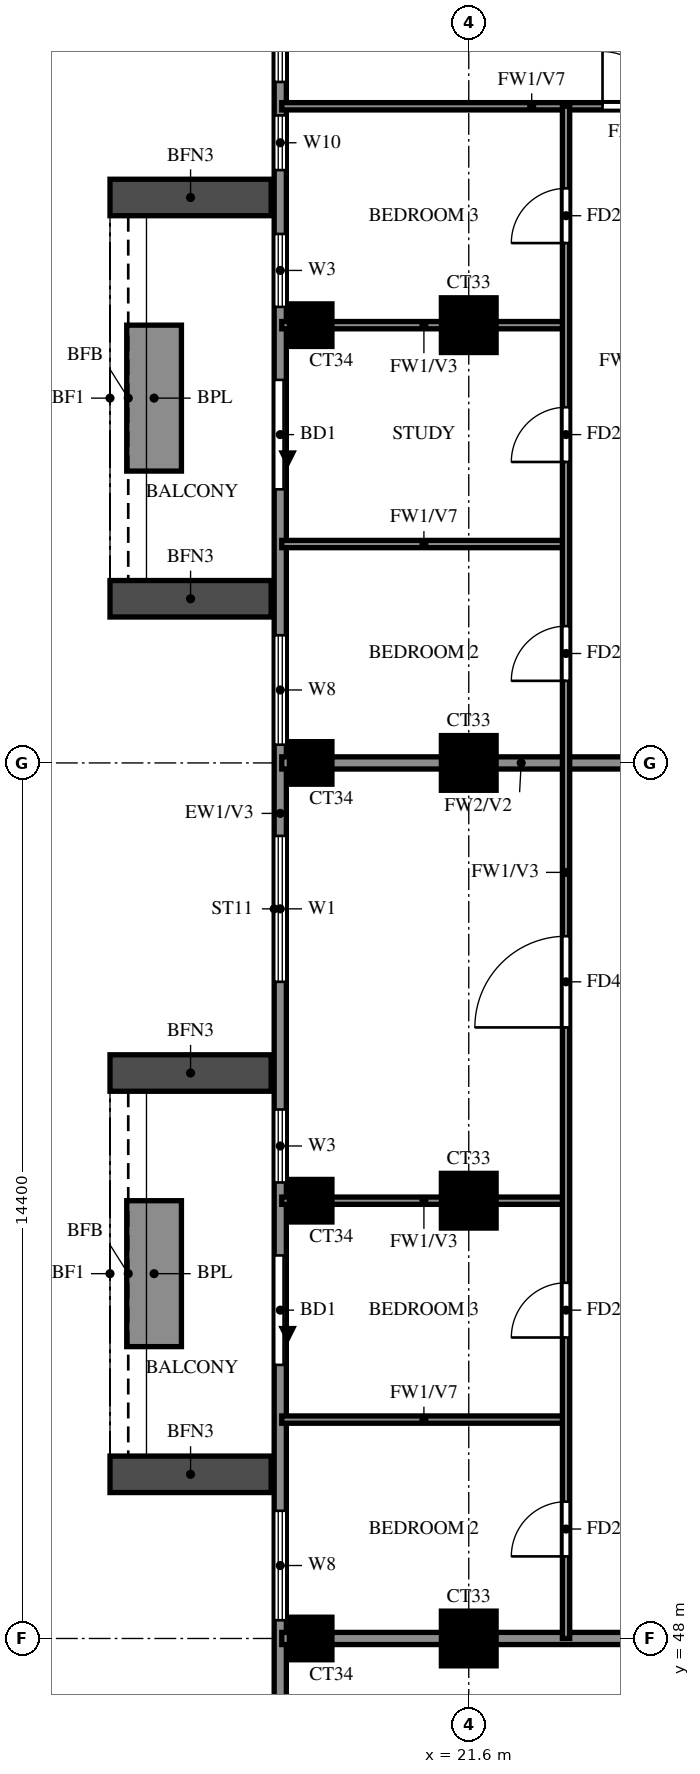
"""IFC4 building model, lengths in metres.
Left out: names, types, materials, properties, quantities, classifications, styles, units other than length and angle.
Written with IfcOpenShell. Run it as: python <this file> out.ifc"""

import sys

from ifc_helpers import new_model, si_unit, direction, frame, frame_2d, origin, origin_2d, place, context, subcontext, project, spatial, rectangle, extrude, source, transform, mapped, element, fill, save


model = new_model("IFC4")
c1 = context("Model", 3, precision=1e-05, world=origin(), true_north=direction((0.0, 1.0)))
c2 = subcontext(c1, "Body", "Model", "MODEL_VIEW")
j1 = project(units=[si_unit("LENGTHUNIT", "METRE"), si_unit("PLANEANGLEUNIT", "RADIAN")], contexts=[c1])
p1 = place(None, origin())
s1 = spatial("IfcSite", under=j1, at=p1, CompositionType="ELEMENT")
p2 = place(p1, origin())
s2 = spatial("IfcBuilding", under=s1, at=p2, CompositionType="ELEMENT")
p3 = place(p2, frame((0.0, 0.0, 222.0)))
s3 = spatial("IfcBuildingStorey", under=s2, at=p3, CompositionType="ELEMENT", Elevation=222.0)
m1 = source(origin(), c2, "Body", "SweptSolid", [
    extrude(rectangle(XDim=0.7, YDim=0.7, at=origin_2d()), origin(), (0.0, 0.0, 1.0), 3.22),
])
p4 = place(p3, frame((19.0, 48.0, 0.0), z_axis=(0.0, 0.0, 1.0), x_axis=(1.0, 0.0, 0.0)))
e1 = element("IfcColumn", 1, at=p4, inside=s3, PredefinedType="COLUMN", context=c2, shape_type="MappedRepresentation", body=[
    mapped(m1, transform((0.0, 0.0, 0.0))),
])
m2 = source(origin(), c2, "Body", "SweptSolid", [
    extrude(rectangle(XDim=0.9, YDim=0.9, at=origin_2d()), origin(), (0.0, 0.0, 1.0), 3.22),
])
p5 = place(p3, frame((21.6, 48.0, 0.0), z_axis=(0.0, 0.0, 1.0), x_axis=(1.0, 0.0, 0.0)))
e2 = element("IfcColumn", 2, at=p5, inside=s3, PredefinedType="COLUMN", context=c2, shape_type="MappedRepresentation", body=[
    mapped(m2, transform((0.0, 0.0, 0.0))),
])
p6 = place(p3, frame((19.0, 55.2, 0.0), z_axis=(0.0, 0.0, 1.0), x_axis=(1.0, 0.0, 0.0)))
e3 = element("IfcColumn", 3, at=p6, inside=s3, PredefinedType="COLUMN", context=c2, shape_type="MappedRepresentation", body=[
    mapped(m1, transform((0.0, 0.0, 0.0))),
])
p7 = place(p3, frame((21.6, 55.2, 0.0), z_axis=(0.0, 0.0, 1.0), x_axis=(1.0, 0.0, 0.0)))
e4 = element("IfcColumn", 4, at=p7, inside=s3, PredefinedType="COLUMN", context=c2, shape_type="MappedRepresentation", body=[
    mapped(m2, transform((0.0, 0.0, 0.0))),
])
p8 = place(p3, frame((19.0, 62.4, 0.0), z_axis=(0.0, 0.0, 1.0), x_axis=(1.0, 0.0, 0.0)))
e5 = element("IfcColumn", 5, at=p8, inside=s3, PredefinedType="COLUMN", context=c2, shape_type="MappedRepresentation", body=[
    mapped(m1, transform((0.0, 0.0, 0.0))),
])
p9 = place(p3, frame((21.6, 62.4, 0.0), z_axis=(0.0, 0.0, 1.0), x_axis=(1.0, 0.0, 0.0)))
e6 = element("IfcColumn", 6, at=p9, inside=s3, PredefinedType="COLUMN", context=c2, shape_type="MappedRepresentation", body=[
    mapped(m2, transform((0.0, 0.0, 0.0))),
])
p10 = place(p3, frame((19.0, 69.6, 0.0), z_axis=(0.0, 0.0, 1.0), x_axis=(1.0, 0.0, 0.0)))
e7 = element("IfcColumn", 7, at=p10, inside=s3, PredefinedType="COLUMN", context=c2, shape_type="MappedRepresentation", body=[
    mapped(m1, transform((0.0, 0.0, 0.0))),
])
p11 = place(p3, frame((21.6, 69.6, 0.0), z_axis=(0.0, 0.0, 1.0), x_axis=(1.0, 0.0, 0.0)))
e8 = element("IfcColumn", 8, at=p11, inside=s3, PredefinedType="COLUMN", context=c2, shape_type="MappedRepresentation", body=[
    mapped(m2, transform((0.0, 0.0, 0.0))),
])
p12 = place(p3, frame((18.5, 76.6, 0.0), z_axis=(0.0, 0.0, 1.0), x_axis=(0.0, -1.0, 0.0)))
e9 = element("IfcWall", 9, at=p12, inside=s3, PredefinedType="SOLIDWALL", context=c2, shape_type="SweptSolid", body=[
    extrude(rectangle(XDim=33.4, YDim=0.2, at=frame_2d((16.7, 0.0))), origin(), (0.0, 0.0, 1.0), 3.22),
])
p13 = place(p12, frame((7.9, 0.0, 0.0)))
e10 = element("IfcOpeningElement", 10, at=p13, cuts=e9, PredefinedType="OPENING", context=c2, shape_type="SweptSolid", body=[
    extrude(rectangle(XDim=1.8, YDim=2.4, at=frame_2d((0.9, 1.2))), frame((0.0, 0.11, 0.0), z_axis=(0.0, -1.0, 0.0), x_axis=(1.0, 0.0, 0.0)), (0.0, 0.0, 1.0), 0.22),
])
p14 = place(p12, frame((22.3, 0.0, 0.0)))
e11 = element("IfcOpeningElement", 11, at=p14, cuts=e9, PredefinedType="OPENING", context=c2, shape_type="SweptSolid", body=[
    extrude(rectangle(XDim=1.8, YDim=2.4, at=frame_2d((0.9, 1.2))), frame((0.0, 0.11, 0.0), z_axis=(0.0, -1.0, 0.0), x_axis=(1.0, 0.0, 0.0)), (0.0, 0.0, 1.0), 0.22),
])
p15 = place(p12, frame((29.7, 0.0, 0.6)))
e12 = element("IfcOpeningElement", 12, at=p15, cuts=e9, PredefinedType="OPENING", context=c2, shape_type="SweptSolid", body=[
    extrude(rectangle(XDim=2.4, YDim=2.4, at=frame_2d((1.2, 1.2))), frame((0.0, 0.11, 0.0), z_axis=(0.0, -1.0, 0.0), x_axis=(1.0, 0.0, 0.0)), (0.0, 0.0, 1.0), 0.22),
])
p16 = place(p12, frame((26.5, 0.0, 0.6)))
e13 = element("IfcOpeningElement", 13, at=p16, cuts=e9, PredefinedType="OPENING", context=c2, shape_type="SweptSolid", body=[
    extrude(rectangle(XDim=1.8, YDim=2.4, at=frame_2d((0.9, 1.2))), frame((0.0, 0.11, 0.0), z_axis=(0.0, -1.0, 0.0), x_axis=(1.0, 0.0, 0.0)), (0.0, 0.0, 1.0), 0.22),
])
p17 = place(p12, frame((15.4, 0.0, 0.6)))
e14 = element("IfcOpeningElement", 14, at=p17, cuts=e9, PredefinedType="OPENING", context=c2, shape_type="SweptSolid", body=[
    extrude(rectangle(XDim=2.4, YDim=2.4, at=frame_2d((1.2, 1.2))), frame((0.0, 0.11, 0.0), z_axis=(0.0, -1.0, 0.0), x_axis=(1.0, 0.0, 0.0)), (0.0, 0.0, 1.0), 0.22),
])
p18 = place(p12, frame((19.9, 0.0, 0.6)))
e15 = element("IfcOpeningElement", 15, at=p18, cuts=e9, PredefinedType="OPENING", context=c2, shape_type="SweptSolid", body=[
    extrude(rectangle(XDim=1.2, YDim=2.4, at=frame_2d((0.6, 1.2))), frame((0.0, 0.11, 0.0), z_axis=(0.0, -1.0, 0.0), x_axis=(1.0, 0.0, 0.0)), (0.0, 0.0, 1.0), 0.22),
])
p19 = place(p12, frame((12.1, 0.0, 0.6)))
e16 = element("IfcOpeningElement", 16, at=p19, cuts=e9, PredefinedType="OPENING", context=c2, shape_type="SweptSolid", body=[
    extrude(rectangle(XDim=1.8, YDim=2.4, at=frame_2d((0.9, 1.2))), frame((0.0, 0.11, 0.0), z_axis=(0.0, -1.0, 0.0), x_axis=(1.0, 0.0, 0.0)), (0.0, 0.0, 1.0), 0.22),
])
p20 = place(p12, frame((3.55, 0.0, 0.6)))
e17 = element("IfcOpeningElement", 17, at=p20, cuts=e9, PredefinedType="OPENING", context=c2, shape_type="SweptSolid", body=[
    extrude(rectangle(XDim=0.9, YDim=2.4, at=frame_2d((0.45, 1.2))), frame((0.0, 0.11, 0.0), z_axis=(0.0, -1.0, 0.0), x_axis=(1.0, 0.0, 0.0)), (0.0, 0.0, 1.0), 0.22),
])
p21 = place(p12, frame((5.5, 0.0, 0.6)))
e18 = element("IfcOpeningElement", 18, at=p21, cuts=e9, PredefinedType="OPENING", context=c2, shape_type="SweptSolid", body=[
    extrude(rectangle(XDim=1.2, YDim=2.4, at=frame_2d((0.6, 1.2))), frame((0.0, 0.11, 0.0), z_axis=(0.0, -1.0, 0.0), x_axis=(1.0, 0.0, 0.0)), (0.0, 0.0, 1.0), 0.22),
])
p22 = place(p12, frame((0.6, 0.0, 0.6)))
e19 = element("IfcOpeningElement", 19, at=p22, cuts=e9, PredefinedType="OPENING", context=c2, shape_type="SweptSolid", body=[
    extrude(rectangle(XDim=2.4, YDim=2.4, at=frame_2d((1.2, 1.2))), frame((0.0, 0.11, 0.0), z_axis=(0.0, -1.0, 0.0), x_axis=(1.0, 0.0, 0.0)), (0.0, 0.0, 1.0), 0.22),
])
for number, where, z_axis, x_axis in (
    (20, (18.35, 71.7, 0.0), (0.0, 0.0, 1.0), (-1.0, 0.0, 0.0)),
    (21, (18.35, 65.1, 0.0), (0.0, 0.0, 1.0), (-1.0, 0.0, 0.0)),
):
    element("IfcWall", number, at=place(p3, frame(where, z_axis=z_axis, x_axis=x_axis)), inside=s3, PredefinedType="SOLIDWALL", context=c2, shape_type="SweptSolid", body=[
        extrude(rectangle(XDim=2.65, YDim=0.6, at=frame_2d((1.325, 0.0))), origin(), (0.0, 0.0, 1.0), 2.85),
    ])
p23 = place(p3, frame((16.425, 69.6, 0.0), z_axis=(0.0, 0.0, 1.0), x_axis=(0.0, -1.0, 0.0)))
e22 = element("IfcWall", 22, at=p23, inside=s3, PredefinedType="SOLIDWALL", context=c2, shape_type="SweptSolid", body=[
    extrude(rectangle(XDim=2.4, YDim=0.9, at=frame_2d((1.2, 0.0))), origin(), (0.0, 0.0, 1.0), 0.9),
])
for number, where, z_axis, x_axis in (
    (23, (18.35, 57.3, 0.0), (0.0, 0.0, 1.0), (-1.0, 0.0, 0.0)),
    (24, (18.35, 50.7, 0.0), (0.0, 0.0, 1.0), (-1.0, 0.0, 0.0)),
):
    element("IfcWall", number, at=place(p3, frame(where, z_axis=z_axis, x_axis=x_axis)), inside=s3, PredefinedType="SOLIDWALL", context=c2, shape_type="SweptSolid", body=[
        extrude(rectangle(XDim=2.65, YDim=0.6, at=frame_2d((1.325, 0.0))), origin(), (0.0, 0.0, 1.0), 2.85),
    ])
p24 = place(p3, frame((16.425, 55.2, 0.0), z_axis=(0.0, 0.0, 1.0), x_axis=(0.0, -1.0, 0.0)))
e25 = element("IfcWall", 25, at=p24, inside=s3, PredefinedType="SOLIDWALL", context=c2, shape_type="SweptSolid", body=[
    extrude(rectangle(XDim=2.4, YDim=0.9, at=frame_2d((1.2, 0.0))), origin(), (0.0, 0.0, 1.0), 0.9),
])
p25 = place(p3, frame((18.525, 48.0, 0.0), z_axis=(0.0, 0.0, 1.0), x_axis=(1.0, 0.0, 0.0)))
e26 = element("IfcWall", 26, at=p25, inside=s3, PredefinedType="SOLIDWALL", context=c2, shape_type="SweptSolid", body=[
    extrude(rectangle(XDim=15.075, YDim=0.2, at=frame_2d((7.538, 0.0))), origin(), (0.0, 0.0, 1.0), 3.22),
])
p26 = place(p3, frame((18.525, 62.4, 0.0), z_axis=(0.0, 0.0, 1.0), x_axis=(1.0, 0.0, 0.0)))
e27 = element("IfcWall", 27, at=p26, inside=s3, PredefinedType="SOLIDWALL", context=c2, shape_type="SweptSolid", body=[
    extrude(rectangle(XDim=7.875, YDim=0.2, at=frame_2d((3.938, 0.0))), origin(), (0.0, 0.0, 1.0), 3.22),
])
p27 = place(p3, frame((18.525, 51.6, 0.0), z_axis=(0.0, 0.0, 1.0), x_axis=(1.0, 0.0, 0.0)))
e28 = element("IfcWall", 28, at=p27, inside=s3, PredefinedType="PARTITIONING", context=c2, shape_type="SweptSolid", body=[
    extrude(rectangle(XDim=4.675, YDim=0.12, at=frame_2d((2.337, 0.0))), origin(), (0.0, 0.0, 1.0), 2.32),
])
p28 = place(p3, frame((18.525, 55.2, 0.0), z_axis=(0.0, 0.0, 1.0), x_axis=(1.0, 0.0, 0.0)))
e29 = element("IfcWall", 29, at=p28, inside=s3, PredefinedType="PARTITIONING", context=c2, shape_type="SweptSolid", body=[
    extrude(rectangle(XDim=4.675, YDim=0.12, at=frame_2d((2.337, 0.0))), origin(), (0.0, 0.0, 1.0), 3.22),
])
p29 = place(p3, frame((18.525, 66.0, 0.0), z_axis=(0.0, 0.0, 1.0), x_axis=(1.0, 0.0, 0.0)))
e30 = element("IfcWall", 30, at=p29, inside=s3, PredefinedType="PARTITIONING", context=c2, shape_type="SweptSolid", body=[
    extrude(rectangle(XDim=4.675, YDim=0.12, at=frame_2d((2.337, 0.0))), origin(), (0.0, 0.0, 1.0), 2.32),
])
p30 = place(p3, frame((18.525, 69.6, 0.0), z_axis=(0.0, 0.0, 1.0), x_axis=(1.0, 0.0, 0.0)))
e31 = element("IfcWall", 31, at=p30, inside=s3, PredefinedType="PARTITIONING", context=c2, shape_type="SweptSolid", body=[
    extrude(rectangle(XDim=4.675, YDim=0.12, at=frame_2d((2.337, 0.0))), origin(), (0.0, 0.0, 1.0), 3.22),
])
p31 = place(p3, frame((18.525, 73.2, 0.0), z_axis=(0.0, 0.0, 1.0), x_axis=(1.0, 0.0, 0.0)))
e32 = element("IfcWall", 32, at=p31, inside=s3, PredefinedType="PARTITIONING", context=c2, shape_type="SweptSolid", body=[
    extrude(rectangle(XDim=10.275, YDim=0.12, at=frame_2d((5.138, 0.0))), origin(), (0.0, 0.0, 1.0), 2.32),
])
p32 = place(p31, frame((5.275, 0.0, 0.0)))
e33 = element("IfcOpeningElement", 33, at=p32, cuts=e32, PredefinedType="OPENING", context=c2, shape_type="SweptSolid", body=[
    extrude(rectangle(XDim=0.9, YDim=2.1, at=frame_2d((0.45, 1.05))), frame((0.0, 0.07, 0.0), z_axis=(0.0, -1.0, 0.0), x_axis=(1.0, 0.0, 0.0)), (0.0, 0.0, 1.0), 0.14),
])
p33 = place(p3, frame((23.2, 48.0, 0.0), z_axis=(0.0, 0.0, 1.0), x_axis=(0.0, 1.0, 0.0)))
e34 = element("IfcWall", 34, at=p33, inside=s3, PredefinedType="PARTITIONING", context=c2, shape_type="SweptSolid", body=[
    extrude(rectangle(XDim=25.2, YDim=0.12, at=frame_2d((12.6, 0.0))), origin(), (0.0, 0.0, 1.0), 3.22),
])
p34 = place(p33, frame((1.35, 0.0, 0.0)))
e35 = element("IfcOpeningElement", 35, at=p34, cuts=e34, PredefinedType="OPENING", context=c2, shape_type="SweptSolid", body=[
    extrude(rectangle(XDim=0.9, YDim=2.1, at=frame_2d((0.45, 1.05))), frame((0.0, 0.07, 0.0), z_axis=(0.0, -1.0, 0.0), x_axis=(1.0, 0.0, 0.0)), (0.0, 0.0, 1.0), 0.14),
])
p35 = place(p33, frame((4.95, 0.0, 0.0)))
e36 = element("IfcOpeningElement", 36, at=p35, cuts=e34, PredefinedType="OPENING", context=c2, shape_type="SweptSolid", body=[
    extrude(rectangle(XDim=0.9, YDim=2.1, at=frame_2d((0.45, 1.05))), frame((0.0, 0.07, 0.0), z_axis=(0.0, -1.0, 0.0), x_axis=(1.0, 0.0, 0.0)), (0.0, 0.0, 1.0), 0.14),
])
p36 = place(p33, frame((10.05, 0.0, 0.0)))
e37 = element("IfcOpeningElement", 37, at=p36, cuts=e34, PredefinedType="OPENING", context=c2, shape_type="SweptSolid", body=[
    extrude(rectangle(XDim=1.5, YDim=2.1, at=frame_2d((0.75, 1.05))), frame((0.0, 0.07, 0.0), z_axis=(0.0, -1.0, 0.0), x_axis=(1.0, 0.0, 0.0)), (0.0, 0.0, 1.0), 0.14),
])
p37 = place(p33, frame((15.75, 0.0, 0.0)))
e38 = element("IfcOpeningElement", 38, at=p37, cuts=e34, PredefinedType="OPENING", context=c2, shape_type="SweptSolid", body=[
    extrude(rectangle(XDim=0.9, YDim=2.1, at=frame_2d((0.45, 1.05))), frame((0.0, 0.07, 0.0), z_axis=(0.0, -1.0, 0.0), x_axis=(1.0, 0.0, 0.0)), (0.0, 0.0, 1.0), 0.14),
])
p38 = place(p33, frame((19.35, 0.0, 0.0)))
e39 = element("IfcOpeningElement", 39, at=p38, cuts=e34, PredefinedType="OPENING", context=c2, shape_type="SweptSolid", body=[
    extrude(rectangle(XDim=0.9, YDim=2.1, at=frame_2d((0.45, 1.05))), frame((0.0, 0.07, 0.0), z_axis=(0.0, -1.0, 0.0), x_axis=(1.0, 0.0, 0.0)), (0.0, 0.0, 1.0), 0.14),
])
p39 = place(p33, frame((22.95, 0.0, 0.0)))
e40 = element("IfcOpeningElement", 40, at=p39, cuts=e34, PredefinedType="OPENING", context=c2, shape_type="SweptSolid", body=[
    extrude(rectangle(XDim=0.9, YDim=2.1, at=frame_2d((0.45, 1.05))), frame((0.0, 0.07, 0.0), z_axis=(0.0, -1.0, 0.0), x_axis=(1.0, 0.0, 0.0)), (0.0, 0.0, 1.0), 0.14),
])
p40 = place(p13, origin())
e41 = element("IfcDoor", 41, at=p40, inside=s3, OperationType="DOUBLE_DOOR_SLIDING", PredefinedType="DOOR", context=c2, shape_type="SweptSolid", body=[
    extrude(rectangle(XDim=1.8, YDim=2.4, at=frame_2d((0.9, 1.2))), frame((0.0, 0.025, 0.0), z_axis=(0.0, -1.0, 0.0), x_axis=(1.0, 0.0, 0.0)), (0.0, 0.0, 1.0), 0.05),
])
fill(e10, e41)
p41 = place(p14, origin())
e42 = element("IfcDoor", 42, at=p41, inside=s3, OperationType="DOUBLE_DOOR_SLIDING", PredefinedType="DOOR", context=c2, shape_type="SweptSolid", body=[
    extrude(rectangle(XDim=1.8, YDim=2.4, at=frame_2d((0.9, 1.2))), frame((0.0, 0.025, 0.0), z_axis=(0.0, -1.0, 0.0), x_axis=(1.0, 0.0, 0.0)), (0.0, 0.0, 1.0), 0.05),
])
fill(e11, e42)
p42 = place(p16, origin())
e43 = element("IfcWindow", 43, at=p42, inside=s3, PartitioningType="DOUBLE_PANEL_VERTICAL", PredefinedType="WINDOW", context=c2, shape_type="SweptSolid", body=[
    extrude(rectangle(XDim=1.8, YDim=2.4, at=frame_2d((0.9, 1.2))), frame((0.0, 0.03, 0.0), z_axis=(0.0, -1.0, 0.0), x_axis=(1.0, 0.0, 0.0)), (0.0, 0.0, 1.0), 0.06),
])
fill(e13, e43)
p43 = place(p17, origin())
e44 = element("IfcWindow", 44, at=p43, inside=s3, PartitioningType="DOUBLE_PANEL_VERTICAL", PredefinedType="WINDOW", context=c2, shape_type="SweptSolid", body=[
    extrude(rectangle(XDim=2.4, YDim=2.4, at=frame_2d((1.2, 1.2))), frame((0.0, 0.03, 0.0), z_axis=(0.0, -1.0, 0.0), x_axis=(1.0, 0.0, 0.0)), (0.0, 0.0, 1.0), 0.06),
])
fill(e14, e44)
p44 = place(p18, origin())
e45 = element("IfcWindow", 45, at=p44, inside=s3, PartitioningType="SINGLE_PANEL", PredefinedType="WINDOW", context=c2, shape_type="SweptSolid", body=[
    extrude(rectangle(XDim=1.2, YDim=2.4, at=frame_2d((0.6, 1.2))), frame((0.0, 0.03, 0.0), z_axis=(0.0, -1.0, 0.0), x_axis=(1.0, 0.0, 0.0)), (0.0, 0.0, 1.0), 0.06),
])
fill(e15, e45)
p45 = place(p19, origin())
e46 = element("IfcWindow", 46, at=p45, inside=s3, PartitioningType="DOUBLE_PANEL_VERTICAL", PredefinedType="WINDOW", context=c2, shape_type="SweptSolid", body=[
    extrude(rectangle(XDim=1.8, YDim=2.4, at=frame_2d((0.9, 1.2))), frame((0.0, 0.03, 0.0), z_axis=(0.0, -1.0, 0.0), x_axis=(1.0, 0.0, 0.0)), (0.0, 0.0, 1.0), 0.06),
])
fill(e16, e46)
p46 = place(p20, origin())
e47 = element("IfcWindow", 47, at=p46, inside=s3, PartitioningType="SINGLE_PANEL", PredefinedType="WINDOW", context=c2, shape_type="SweptSolid", body=[
    extrude(rectangle(XDim=0.9, YDim=2.4, at=frame_2d((0.45, 1.2))), frame((0.0, 0.03, 0.0), z_axis=(0.0, -1.0, 0.0), x_axis=(1.0, 0.0, 0.0)), (0.0, 0.0, 1.0), 0.06),
])
fill(e17, e47)
p47 = place(p21, origin())
e48 = element("IfcWindow", 48, at=p47, inside=s3, PartitioningType="SINGLE_PANEL", PredefinedType="WINDOW", context=c2, shape_type="SweptSolid", body=[
    extrude(rectangle(XDim=1.2, YDim=2.4, at=frame_2d((0.6, 1.2))), frame((0.0, 0.03, 0.0), z_axis=(0.0, -1.0, 0.0), x_axis=(1.0, 0.0, 0.0)), (0.0, 0.0, 1.0), 0.06),
])
fill(e18, e48)
p48 = place(p22, origin())
e49 = element("IfcWindow", 49, at=p48, inside=s3, PartitioningType="DOUBLE_PANEL_VERTICAL", PredefinedType="WINDOW", context=c2, shape_type="SweptSolid", body=[
    extrude(rectangle(XDim=2.4, YDim=2.4, at=frame_2d((1.2, 1.2))), frame((0.0, 0.03, 0.0), z_axis=(0.0, -1.0, 0.0), x_axis=(1.0, 0.0, 0.0)), (0.0, 0.0, 1.0), 0.06),
])
fill(e19, e49)
p49 = place(p34, origin())
e50 = element("IfcDoor", 50, at=p49, inside=s3, OperationType="SINGLE_SWING_LEFT", PredefinedType="DOOR", context=c2, shape_type="SweptSolid", body=[
    extrude(rectangle(XDim=0.9, YDim=2.1, at=frame_2d((0.45, 1.05))), frame((0.0, 0.025, 0.0), z_axis=(0.0, -1.0, 0.0), x_axis=(1.0, 0.0, 0.0)), (0.0, 0.0, 1.0), 0.05),
])
fill(e35, e50)
p50 = place(p35, origin())
e51 = element("IfcDoor", 51, at=p50, inside=s3, OperationType="SINGLE_SWING_LEFT", PredefinedType="DOOR", context=c2, shape_type="SweptSolid", body=[
    extrude(rectangle(XDim=0.9, YDim=2.1, at=frame_2d((0.45, 1.05))), frame((0.0, 0.025, 0.0), z_axis=(0.0, -1.0, 0.0), x_axis=(1.0, 0.0, 0.0)), (0.0, 0.0, 1.0), 0.05),
])
fill(e36, e51)
p51 = place(p36, origin())
e52 = element("IfcDoor", 52, at=p51, inside=s3, OperationType="SINGLE_SWING_RIGHT", PredefinedType="DOOR", context=c2, shape_type="SweptSolid", body=[
    extrude(rectangle(XDim=1.5, YDim=2.1, at=frame_2d((0.75, 1.05))), frame((0.0, 0.025, 0.0), z_axis=(0.0, -1.0, 0.0), x_axis=(1.0, 0.0, 0.0)), (0.0, 0.0, 1.0), 0.05),
])
fill(e37, e52)
p52 = place(p37, origin())
e53 = element("IfcDoor", 53, at=p52, inside=s3, OperationType="SINGLE_SWING_RIGHT", PredefinedType="DOOR", context=c2, shape_type="SweptSolid", body=[
    extrude(rectangle(XDim=0.9, YDim=2.1, at=frame_2d((0.45, 1.05))), frame((0.0, 0.025, 0.0), z_axis=(0.0, -1.0, 0.0), x_axis=(1.0, 0.0, 0.0)), (0.0, 0.0, 1.0), 0.05),
])
fill(e38, e53)
p53 = place(p38, origin())
e54 = element("IfcDoor", 54, at=p53, inside=s3, OperationType="SINGLE_SWING_LEFT", PredefinedType="DOOR", context=c2, shape_type="SweptSolid", body=[
    extrude(rectangle(XDim=0.9, YDim=2.1, at=frame_2d((0.45, 1.05))), frame((0.0, 0.025, 0.0), z_axis=(0.0, -1.0, 0.0), x_axis=(1.0, 0.0, 0.0)), (0.0, 0.0, 1.0), 0.05),
])
fill(e39, e54)
p54 = place(p39, origin())
e55 = element("IfcDoor", 55, at=p54, inside=s3, OperationType="SINGLE_SWING_LEFT", PredefinedType="DOOR", context=c2, shape_type="SweptSolid", body=[
    extrude(rectangle(XDim=0.9, YDim=2.1, at=frame_2d((0.45, 1.05))), frame((0.0, 0.025, 0.0), z_axis=(0.0, -1.0, 0.0), x_axis=(1.0, 0.0, 0.0)), (0.0, 0.0, 1.0), 0.05),
])
fill(e40, e55)
p55 = place(p32, origin())
e56 = element("IfcDoor", 56, at=p55, inside=s3, OperationType="SINGLE_SWING_RIGHT", PredefinedType="DOOR", context=c2, shape_type="SweptSolid", body=[
    extrude(rectangle(XDim=0.9, YDim=2.1, at=frame_2d((0.45, 1.05))), frame((0.0, 0.025, 0.0), z_axis=(0.0, -1.0, 0.0), x_axis=(1.0, 0.0, 0.0)), (0.0, 0.0, 1.0), 0.05),
])
fill(e33, e56)
save(model, sys.argv[1])
